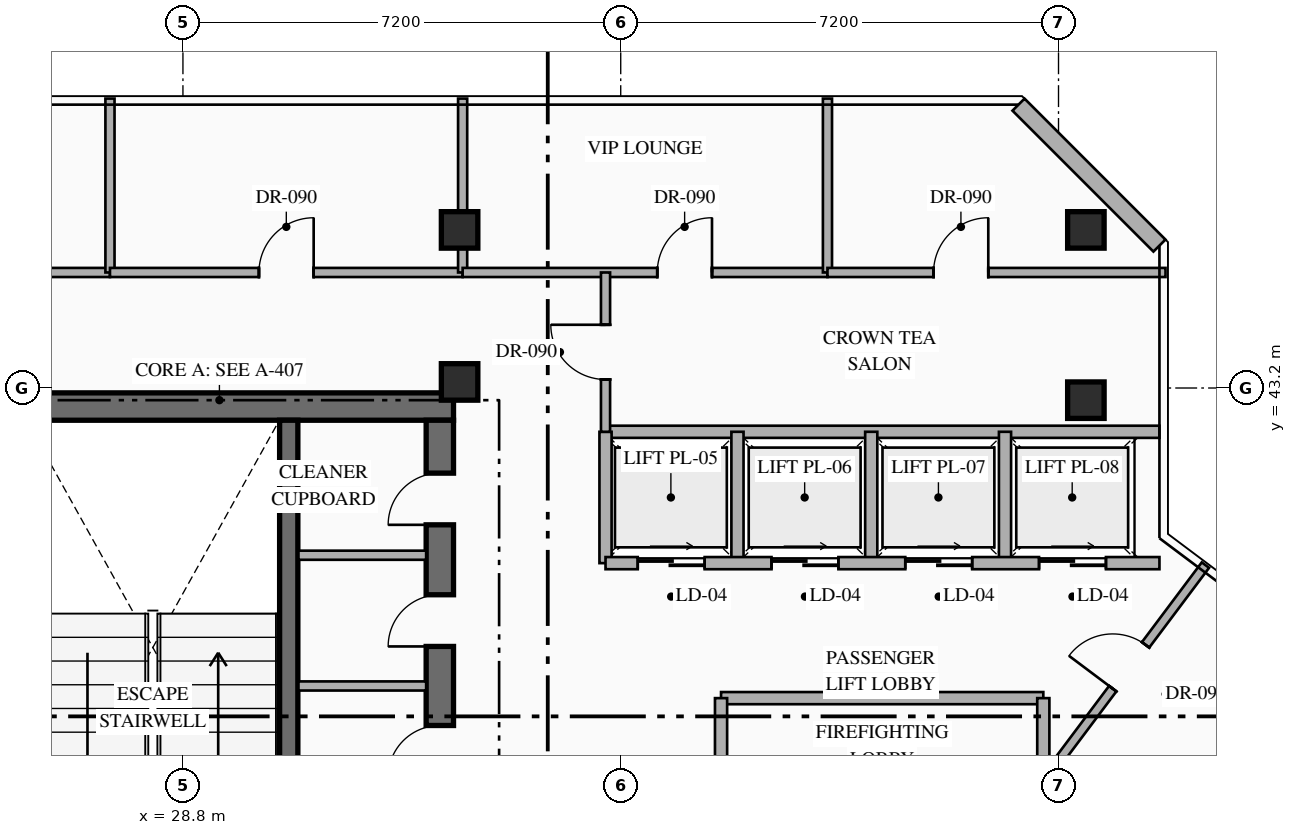
"""IFC4 building model, lengths in metres.
Left out: names, types, materials, properties, quantities, classifications, styles, units other than length and angle.
Written with IfcOpenShell. Run it as: python <this file> out.ifc"""

import sys

from ifc_helpers import new_model, si_unit, direction, frame, frame_2d, origin, origin_2d, place, context, subcontext, project, spatial, rectangle, hollow_rectangle, extrude, element, fill, save


model = new_model("IFC4")
c1 = context("Model", 3, precision=1e-05, world=origin(), true_north=direction((0.0, 1.0)))
c2 = subcontext(c1, "Body", "Model", "MODEL_VIEW")
j1 = project(units=[si_unit("LENGTHUNIT", "METRE"), si_unit("PLANEANGLEUNIT", "RADIAN")], contexts=[c1])
p1 = place(None, origin())
s1 = spatial("IfcSite", under=j1, at=p1, CompositionType="ELEMENT")
p2 = place(p1, origin())
s2 = spatial("IfcBuilding", under=s1, at=p2, CompositionType="ELEMENT")
p3 = place(p2, frame((0.0, 0.0, 273.95)))
s3 = spatial("IfcBuildingStorey", under=s2, at=p3, CompositionType="ELEMENT", Elevation=273.95)
p4 = place(p3, frame((25.77, 42.895, 0.0), z_axis=(0.0, 0.0, 1.0), x_axis=(1.0, 0.0, 0.0)))
e1 = element("IfcWall", 1, at=p4, inside=s3, PredefinedType="SHEAR", context=c2, shape_type="SweptSolid", body=[
    extrude(rectangle(XDim=7.48, YDim=0.45, at=frame_2d((3.74, 0.0))), origin(), (0.0, 0.0, 1.0), 4.0),
])
p5 = place(p3, frame((33.025, 33.19, 0.0), z_axis=(0.0, 0.0, 1.0), x_axis=(0.0, 1.0, 0.0)))
e2 = element("IfcWall", 2, at=p5, inside=s3, PredefinedType="SHEAR", context=c2, shape_type="SweptSolid", body=[
    extrude(rectangle(XDim=9.48, YDim=0.45, at=frame_2d((4.74, 0.0))), origin(), (0.0, 0.0, 1.0), 4.0),
])
p6 = place(p5, frame((3.61, 0.0, 0.0)))
e3 = element("IfcOpeningElement", 3, at=p6, cuts=e2, PredefinedType="OPENING", context=c2, shape_type="SweptSolid", body=[
    extrude(rectangle(XDim=0.85, YDim=2.08, at=frame_2d((0.425, 1.04))), frame((0.0, 0.235, 0.0), z_axis=(0.0, -1.0, 0.0), x_axis=(1.0, 0.0, 0.0)), (0.0, 0.0, 1.0), 0.47),
])
p7 = place(p5, frame((5.76, 0.0, 0.0)))
e4 = element("IfcOpeningElement", 4, at=p7, cuts=e2, PredefinedType="OPENING", context=c2, shape_type="SweptSolid", body=[
    extrude(rectangle(XDim=0.85, YDim=2.08, at=frame_2d((0.425, 1.04))), frame((0.0, 0.235, 0.0), z_axis=(0.0, -1.0, 0.0), x_axis=(1.0, 0.0, 0.0)), (0.0, 0.0, 1.0), 0.47),
])
p8 = place(p5, frame((7.76, 0.0, 0.0)))
e5 = element("IfcOpeningElement", 5, at=p8, cuts=e2, PredefinedType="OPENING", context=c2, shape_type="SweptSolid", body=[
    extrude(rectangle(XDim=0.85, YDim=2.08, at=frame_2d((0.425, 1.04))), frame((0.0, 0.235, 0.0), z_axis=(0.0, -1.0, 0.0), x_axis=(1.0, 0.0, 0.0)), (0.0, 0.0, 1.0), 0.47),
])
p9 = place(p3, frame((30.54, 33.19, 0.0), z_axis=(0.0, 0.0, 1.0), x_axis=(0.0, 1.0, 0.0)))
e6 = element("IfcWall", 6, at=p9, inside=s3, PredefinedType="SHEAR", context=c2, shape_type="SweptSolid", body=[
    extrude(rectangle(XDim=9.48, YDim=0.3, at=frame_2d((4.74, 0.0))), origin(), (0.0, 0.0, 1.0), 4.0),
])
for number, where, z_axis, x_axis in (
    (7, (33.35, 43.3, 0.0), (0.0, 0.0, 1.0), (1.0, 0.0, 0.0)),
    (8, (43.65, 43.0, 0.0), (0.0, 0.0, 1.0), (1.0, 0.0, 0.0)),
    (9, (33.35, 45.8, 0.0), (0.0, 0.0, 1.0), (1.0, 0.0, 0.0)),
    (10, (43.65, 45.8, 0.0), (0.0, 0.0, 1.0), (1.0, 0.0, 0.0)),
):
    element("IfcColumn", number, at=place(p3, frame(where, z_axis=z_axis, x_axis=x_axis)), inside=s3, PredefinedType="COLUMN", context=c2, shape_type="SweptSolid", body=[
        extrude(hollow_rectangle(XDim=0.6, YDim=0.6, WallThickness=0.025, at=origin_2d()), origin(), (0.0, 0.0, 1.0), 4.0),
    ])
p10 = place(p3, frame((42.542, 47.86, 0.0), z_axis=(0.0, 0.0, 1.0), x_axis=(0.707106781187, -0.707106781187, 0.0)))
e11 = element("IfcWall", 11, at=p10, inside=s3, PredefinedType="STANDARD", context=c2, shape_type="SweptSolid", body=[
    extrude(rectangle(XDim=3.278, YDim=0.28, at=frame_2d((1.639, 0.0))), origin(), (0.0, 0.0, 1.0), 3.75),
])
for number, where, z_axis, x_axis in (
    (12, (30.7, 38.3, 0.0), (0.0, 0.0, 1.0), (1.0, 0.0, 0.0)),
    (13, (30.7, 40.45, 0.0), (0.0, 0.0, 1.0), (1.0, 0.0, 0.0)),
):
    element("IfcWall", number, at=place(p3, frame(where, z_axis=z_axis, x_axis=x_axis)), inside=s3, PredefinedType="PARTITIONING", context=c2, shape_type="SweptSolid", body=[
        extrude(rectangle(XDim=2.1, YDim=0.15, at=frame_2d((1.05, 0.0))), origin(), (0.0, 0.0, 1.0), 3.75),
    ])
p11 = place(p3, frame((37.65, 38.1, 0.0), z_axis=(0.0, 0.0, 1.0), x_axis=(1.0, 0.0, 0.0)))
e14 = element("IfcWall", 14, at=p11, inside=s3, PredefinedType="STANDARD", context=c2, shape_type="SweptSolid", body=[
    extrude(rectangle(XDim=5.3, YDim=0.2, at=frame_2d((2.65, 0.0))), origin(), (0.0, 0.0, 1.0), 3.75),
])
p12 = place(p3, frame((42.95, 35.12, 0.0), z_axis=(0.0, 0.0, 1.0), x_axis=(0.0, 1.0, 0.0)))
e15 = element("IfcWall", 15, at=p12, inside=s3, PredefinedType="STANDARD", context=c2, shape_type="SweptSolid", body=[
    extrude(rectangle(XDim=2.98, YDim=0.2, at=frame_2d((1.49, 0.0))), origin(), (0.0, 0.0, 1.0), 3.75),
])
p13 = place(p3, frame((37.65, 35.12, 0.0), z_axis=(0.0, 0.0, 1.0), x_axis=(0.0, 1.0, 0.0)))
e16 = element("IfcWall", 16, at=p13, inside=s3, PredefinedType="STANDARD", context=c2, shape_type="SweptSolid", body=[
    extrude(rectangle(XDim=2.98, YDim=0.2, at=frame_2d((1.49, 0.0))), origin(), (0.0, 0.0, 1.0), 3.75),
])
p14 = place(p13, frame((0.99, 0.0, 0.0)))
e17 = element("IfcOpeningElement", 17, at=p14, cuts=e16, PredefinedType="OPENING", context=c2, shape_type="SweptSolid", body=[
    extrude(rectangle(XDim=1.0, YDim=2.2, at=frame_2d((0.5, 1.1))), frame((0.0, 0.11, 0.0), z_axis=(0.0, -1.0, 0.0), x_axis=(1.0, 0.0, 0.0)), (0.0, 0.0, 1.0), 0.22),
])
p15 = place(p3, frame((35.75, 42.48, 0.0), z_axis=(0.0, 0.0, 1.0), x_axis=(1.0, 0.0, 0.0)))
e18 = element("IfcWall", 18, at=p15, inside=s3, PredefinedType="STANDARD", context=c2, shape_type="SweptSolid", body=[
    extrude(rectangle(XDim=9.11, YDim=0.2, at=frame_2d((4.555, 0.0))), origin(), (0.0, 0.0, 1.0), 3.75),
])
for number, where, z_axis, x_axis in (
    (19, (35.75, 40.32, 0.0), (0.0, 0.0, 1.0), (0.0, 1.0, 0.0)),
    (20, (37.92, 40.32, 0.0), (0.0, 0.0, 1.0), (0.0, 1.0, 0.0)),
    (21, (40.12, 40.32, 0.0), (0.0, 0.0, 1.0), (0.0, 1.0, 0.0)),
    (22, (42.32, 40.32, 0.0), (0.0, 0.0, 1.0), (0.0, 1.0, 0.0)),
):
    element("IfcWall", number, at=place(p3, frame(where, z_axis=z_axis, x_axis=x_axis)), inside=s3, PredefinedType="STANDARD", context=c2, shape_type="SweptSolid", body=[
        extrude(rectangle(XDim=2.16, YDim=0.2, at=frame_2d((1.08, 0.0))), origin(), (0.0, 0.0, 1.0), 3.75),
    ])
p16 = place(p3, frame((35.75, 40.32, 0.0), z_axis=(0.0, 0.0, 1.0), x_axis=(1.0, 0.0, 0.0)))
e23 = element("IfcWall", 23, at=p16, inside=s3, PredefinedType="STANDARD", context=c2, shape_type="SweptSolid", body=[
    extrude(rectangle(XDim=9.11, YDim=0.2, at=frame_2d((4.555, 0.0))), origin(), (0.0, 0.0, 1.0), 3.75),
])
p17 = place(p16, frame((0.53, 0.0, 0.0)))
e24 = element("IfcOpeningElement", 24, at=p17, cuts=e23, PredefinedType="OPENING", context=c2, shape_type="SweptSolid", body=[
    extrude(rectangle(XDim=1.1, YDim=2.18, at=frame_2d((0.55, 1.09))), frame((0.0, 0.11, 0.0), z_axis=(0.0, -1.0, 0.0), x_axis=(1.0, 0.0, 0.0)), (0.0, 0.0, 1.0), 0.22),
])
p18 = place(p16, frame((2.73, 0.0, 0.0)))
e25 = element("IfcOpeningElement", 25, at=p18, cuts=e23, PredefinedType="OPENING", context=c2, shape_type="SweptSolid", body=[
    extrude(rectangle(XDim=1.1, YDim=2.18, at=frame_2d((0.55, 1.09))), frame((0.0, 0.11, 0.0), z_axis=(0.0, -1.0, 0.0), x_axis=(1.0, 0.0, 0.0)), (0.0, 0.0, 1.0), 0.22),
])
p19 = place(p16, frame((4.93, 0.0, 0.0)))
e26 = element("IfcOpeningElement", 26, at=p19, cuts=e23, PredefinedType="OPENING", context=c2, shape_type="SweptSolid", body=[
    extrude(rectangle(XDim=1.1, YDim=2.18, at=frame_2d((0.55, 1.09))), frame((0.0, 0.11, 0.0), z_axis=(0.0, -1.0, 0.0), x_axis=(1.0, 0.0, 0.0)), (0.0, 0.0, 1.0), 0.22),
])
p20 = place(p16, frame((7.13, 0.0, 0.0)))
e27 = element("IfcOpeningElement", 27, at=p20, cuts=e23, PredefinedType="OPENING", context=c2, shape_type="SweptSolid", body=[
    extrude(rectangle(XDim=1.1, YDim=2.18, at=frame_2d((0.55, 1.09))), frame((0.0, 0.11, 0.0), z_axis=(0.0, -1.0, 0.0), x_axis=(1.0, 0.0, 0.0)), (0.0, 0.0, 1.0), 0.22),
])
p21 = place(p3, frame((23.2, 45.1, 0.0), z_axis=(0.0, 0.0, 1.0), x_axis=(1.0, 0.0, 0.0)))
e28 = element("IfcWall", 28, at=p21, inside=s3, PredefinedType="PARTITIONING", context=c2, shape_type="SweptSolid", body=[
    extrude(rectangle(XDim=4.4, YDim=0.15, at=frame_2d((2.2, 0.0))), origin(), (0.0, 0.0, 1.0), 3.75),
])
p22 = place(p21, frame((0.791, 0.0, 0.0)))
e29 = element("IfcOpeningElement", 29, at=p22, cuts=e28, PredefinedType="OPENING", context=c2, shape_type="SweptSolid", body=[
    extrude(rectangle(XDim=0.9, YDim=2.15, at=frame_2d((0.45, 1.075))), frame((0.0, 0.085, 0.0), z_axis=(0.0, -1.0, 0.0), x_axis=(1.0, 0.0, 0.0)), (0.0, 0.0, 1.0), 0.17),
])
p23 = place(p3, frame((27.6, 45.1, 0.0), z_axis=(0.0, 0.0, 1.0), x_axis=(0.0, 1.0, 0.0)))
e30 = element("IfcWall", 30, at=p23, inside=s3, PredefinedType="PARTITIONING", context=c2, shape_type="SweptSolid", body=[
    extrude(rectangle(XDim=2.86, YDim=0.15, at=frame_2d((1.43, 0.0))), origin(), (0.0, 0.0, 1.0), 3.75),
])
p24 = place(p3, frame((27.6, 45.1, 0.0), z_axis=(0.0, 0.0, 1.0), x_axis=(1.0, 0.0, 0.0)))
e31 = element("IfcWall", 31, at=p24, inside=s3, PredefinedType="PARTITIONING", context=c2, shape_type="SweptSolid", body=[
    extrude(rectangle(XDim=5.8, YDim=0.15, at=frame_2d((2.9, 0.0))), origin(), (0.0, 0.0, 1.0), 3.75),
])
p25 = place(p24, frame((2.45, 0.0, 0.0)))
e32 = element("IfcOpeningElement", 32, at=p25, cuts=e31, PredefinedType="OPENING", context=c2, shape_type="SweptSolid", body=[
    extrude(rectangle(XDim=0.9, YDim=2.15, at=frame_2d((0.45, 1.075))), frame((0.0, 0.085, 0.0), z_axis=(0.0, -1.0, 0.0), x_axis=(1.0, 0.0, 0.0)), (0.0, 0.0, 1.0), 0.17),
])
p26 = place(p3, frame((33.4, 45.1, 0.0), z_axis=(0.0, 0.0, 1.0), x_axis=(0.0, 1.0, 0.0)))
e33 = element("IfcWall", 33, at=p26, inside=s3, PredefinedType="PARTITIONING", context=c2, shape_type="SweptSolid", body=[
    extrude(rectangle(XDim=2.86, YDim=0.15, at=frame_2d((1.43, 0.0))), origin(), (0.0, 0.0, 1.0), 3.245),
])
p27 = place(p3, frame((33.4, 45.1, 0.0), z_axis=(0.0, 0.0, 1.0), x_axis=(1.0, 0.0, 0.0)))
e34 = element("IfcWall", 34, at=p27, inside=s3, PredefinedType="PARTITIONING", context=c2, shape_type="SweptSolid", body=[
    extrude(rectangle(XDim=6.0, YDim=0.15, at=frame_2d((3.0, 0.0))), origin(), (0.0, 0.0, 1.0), 3.75),
])
p28 = place(p27, frame((3.201, 0.0, 0.0)))
e35 = element("IfcOpeningElement", 35, at=p28, cuts=e34, PredefinedType="OPENING", context=c2, shape_type="SweptSolid", body=[
    extrude(rectangle(XDim=0.9, YDim=2.15, at=frame_2d((0.45, 1.075))), frame((0.0, 0.085, 0.0), z_axis=(0.0, -1.0, 0.0), x_axis=(1.0, 0.0, 0.0)), (0.0, 0.0, 1.0), 0.17),
])
p29 = place(p3, frame((39.4, 45.1, 0.0), z_axis=(0.0, 0.0, 1.0), x_axis=(0.0, 1.0, 0.0)))
e36 = element("IfcWall", 36, at=p29, inside=s3, PredefinedType="PARTITIONING", context=c2, shape_type="SweptSolid", body=[
    extrude(rectangle(XDim=2.86, YDim=0.15, at=frame_2d((1.43, 0.0))), origin(), (0.0, 0.0, 1.0), 3.75),
])
p30 = place(p3, frame((39.4, 45.1, 0.0), z_axis=(0.0, 0.0, 1.0), x_axis=(1.0, 0.0, 0.0)))
e37 = element("IfcWall", 37, at=p30, inside=s3, PredefinedType="PARTITIONING", context=c2, shape_type="SweptSolid", body=[
    extrude(rectangle(XDim=5.56, YDim=0.15, at=frame_2d((2.78, 0.0))), origin(), (0.0, 0.0, 1.0), 3.75),
])
p31 = place(p30, frame((1.745, 0.0, 0.0)))
e38 = element("IfcOpeningElement", 38, at=p31, cuts=e37, PredefinedType="OPENING", context=c2, shape_type="SweptSolid", body=[
    extrude(rectangle(XDim=0.9, YDim=2.15, at=frame_2d((0.45, 1.075))), frame((0.0, 0.085, 0.0), z_axis=(0.0, -1.0, 0.0), x_axis=(1.0, 0.0, 0.0)), (0.0, 0.0, 1.0), 0.17),
])
p32 = place(p3, frame((35.75, 42.48, 0.0), z_axis=(0.0, 0.0, 1.0), x_axis=(0.0, 1.0, 0.0)))
e39 = element("IfcWall", 39, at=p32, inside=s3, PredefinedType="PARTITIONING", context=c2, shape_type="SweptSolid", body=[
    extrude(rectangle(XDim=2.62, YDim=0.15, at=frame_2d((1.31, 0.0))), origin(), (0.0, 0.0, 1.0), 3.75),
])
p33 = place(p32, frame((0.86, 0.0, 0.0)))
e40 = element("IfcOpeningElement", 40, at=p33, cuts=e39, PredefinedType="OPENING", context=c2, shape_type="SweptSolid", body=[
    extrude(rectangle(XDim=0.9, YDim=2.15, at=frame_2d((0.45, 1.075))), frame((0.0, 0.085, 0.0), z_axis=(0.0, -1.0, 0.0), x_axis=(1.0, 0.0, 0.0)), (0.0, 0.0, 1.0), 0.17),
])
p34 = place(p3, frame((42.94, 36.72, 0.0), z_axis=(0.0, 0.0, 1.0), x_axis=(0.599991241767, 0.8000065686, 0.0)))
e41 = element("IfcWall", 41, at=p34, inside=s3, PredefinedType="PARTITIONING", context=c2, shape_type="SweptSolid", body=[
    extrude(rectangle(XDim=4.46, YDim=0.15, at=frame_2d((2.23, 0.0))), origin(), (0.0, 0.0, 1.0), 3.75),
])
p35 = place(p34, frame((1.92, 0.0, 0.0)))
e42 = element("IfcOpeningElement", 42, at=p35, cuts=e41, PredefinedType="OPENING", context=c2, shape_type="SweptSolid", body=[
    extrude(rectangle(XDim=0.9, YDim=2.15, at=frame_2d((0.45, 1.075))), frame((0.0, 0.085, 0.0), z_axis=(0.0, -1.0, 0.0), x_axis=(1.0, 0.0, 0.0)), (0.0, 0.0, 1.0), 0.17),
])
p36 = place(p6, origin())
e43 = element("IfcDoor", 43, at=p36, inside=s3, OperationType="SINGLE_SWING_LEFT", PredefinedType="DOOR", context=c2, shape_type="SweptSolid", body=[
    extrude(rectangle(XDim=0.85, YDim=2.08, at=frame_2d((0.425, 1.04))), frame((0.0, 0.025, 0.0), z_axis=(0.0, -1.0, 0.0), x_axis=(1.0, 0.0, 0.0)), (0.0, 0.0, 1.0), 0.05),
])
fill(e3, e43)
p37 = place(p7, origin())
e44 = element("IfcDoor", 44, at=p37, inside=s3, OperationType="SINGLE_SWING_LEFT", PredefinedType="DOOR", context=c2, shape_type="SweptSolid", body=[
    extrude(rectangle(XDim=0.85, YDim=2.08, at=frame_2d((0.425, 1.04))), frame((0.0, 0.025, 0.0), z_axis=(0.0, -1.0, 0.0), x_axis=(1.0, 0.0, 0.0)), (0.0, 0.0, 1.0), 0.05),
])
fill(e4, e44)
p38 = place(p8, origin())
e45 = element("IfcDoor", 45, at=p38, inside=s3, OperationType="SINGLE_SWING_LEFT", PredefinedType="DOOR", context=c2, shape_type="SweptSolid", body=[
    extrude(rectangle(XDim=0.85, YDim=2.08, at=frame_2d((0.425, 1.04))), frame((0.0, 0.025, 0.0), z_axis=(0.0, -1.0, 0.0), x_axis=(1.0, 0.0, 0.0)), (0.0, 0.0, 1.0), 0.05),
])
fill(e5, e45)
p39 = place(p17, origin())
e46 = element("IfcDoor", 46, at=p39, inside=s3, OperationType="SLIDING_TO_RIGHT", PredefinedType="USERDEFINED", context=c2, shape_type="SweptSolid", body=[
    extrude(rectangle(XDim=1.1, YDim=2.18, at=frame_2d((0.55, 1.09))), frame((0.0, 0.025, 0.0), z_axis=(0.0, -1.0, 0.0), x_axis=(1.0, 0.0, 0.0)), (0.0, 0.0, 1.0), 0.05),
])
fill(e24, e46)
p40 = place(p18, origin())
e47 = element("IfcDoor", 47, at=p40, inside=s3, OperationType="SLIDING_TO_RIGHT", PredefinedType="USERDEFINED", context=c2, shape_type="SweptSolid", body=[
    extrude(rectangle(XDim=1.1, YDim=2.18, at=frame_2d((0.55, 1.09))), frame((0.0, 0.025, 0.0), z_axis=(0.0, -1.0, 0.0), x_axis=(1.0, 0.0, 0.0)), (0.0, 0.0, 1.0), 0.05),
])
fill(e25, e47)
p41 = place(p19, origin())
e48 = element("IfcDoor", 48, at=p41, inside=s3, OperationType="SLIDING_TO_RIGHT", PredefinedType="USERDEFINED", context=c2, shape_type="SweptSolid", body=[
    extrude(rectangle(XDim=1.1, YDim=2.18, at=frame_2d((0.55, 1.09))), frame((0.0, 0.025, 0.0), z_axis=(0.0, -1.0, 0.0), x_axis=(1.0, 0.0, 0.0)), (0.0, 0.0, 1.0), 0.05),
])
fill(e26, e48)
p42 = place(p20, origin())
e49 = element("IfcDoor", 49, at=p42, inside=s3, OperationType="SLIDING_TO_RIGHT", PredefinedType="USERDEFINED", context=c2, shape_type="SweptSolid", body=[
    extrude(rectangle(XDim=1.1, YDim=2.18, at=frame_2d((0.55, 1.09))), frame((0.0, 0.025, 0.0), z_axis=(0.0, -1.0, 0.0), x_axis=(1.0, 0.0, 0.0)), (0.0, 0.0, 1.0), 0.05),
])
fill(e27, e49)
p43 = place(p25, origin())
e50 = element("IfcDoor", 50, at=p43, inside=s3, OperationType="SINGLE_SWING_RIGHT", PredefinedType="DOOR", context=c2, shape_type="SweptSolid", body=[
    extrude(rectangle(XDim=0.9, YDim=2.15, at=frame_2d((0.45, 1.075))), frame((0.0, 0.025, 0.0), z_axis=(0.0, -1.0, 0.0), x_axis=(1.0, 0.0, 0.0)), (0.0, 0.0, 1.0), 0.05),
])
fill(e32, e50)
p44 = place(p28, origin())
e51 = element("IfcDoor", 51, at=p44, inside=s3, OperationType="SINGLE_SWING_RIGHT", PredefinedType="DOOR", context=c2, shape_type="SweptSolid", body=[
    extrude(rectangle(XDim=0.9, YDim=2.15, at=frame_2d((0.45, 1.075))), frame((0.0, 0.025, 0.0), z_axis=(0.0, -1.0, 0.0), x_axis=(1.0, 0.0, 0.0)), (0.0, 0.0, 1.0), 0.05),
])
fill(e35, e51)
p45 = place(p31, origin())
e52 = element("IfcDoor", 52, at=p45, inside=s3, OperationType="SINGLE_SWING_RIGHT", PredefinedType="DOOR", context=c2, shape_type="SweptSolid", body=[
    extrude(rectangle(XDim=0.9, YDim=2.15, at=frame_2d((0.45, 1.075))), frame((0.0, 0.025, 0.0), z_axis=(0.0, -1.0, 0.0), x_axis=(1.0, 0.0, 0.0)), (0.0, 0.0, 1.0), 0.05),
])
fill(e38, e52)
p46 = place(p33, origin())
e53 = element("IfcDoor", 53, at=p46, inside=s3, OperationType="SINGLE_SWING_RIGHT", PredefinedType="DOOR", context=c2, shape_type="SweptSolid", body=[
    extrude(rectangle(XDim=0.9, YDim=2.15, at=frame_2d((0.45, 1.075))), frame((0.0, 0.025, 0.0), z_axis=(0.0, -1.0, 0.0), x_axis=(1.0, 0.0, 0.0)), (0.0, 0.0, 1.0), 0.05),
])
fill(e40, e53)
p47 = place(p35, origin())
e54 = element("IfcDoor", 54, at=p47, inside=s3, OperationType="SINGLE_SWING_LEFT", PredefinedType="DOOR", context=c2, shape_type="SweptSolid", body=[
    extrude(rectangle(XDim=0.9, YDim=2.15, at=frame_2d((0.45, 1.075))), frame((0.0, 0.025, 0.0), z_axis=(0.0, -1.0, 0.0), x_axis=(1.0, 0.0, 0.0)), (0.0, 0.0, 1.0), 0.05),
])
fill(e42, e54)
save(model, sys.argv[1])
